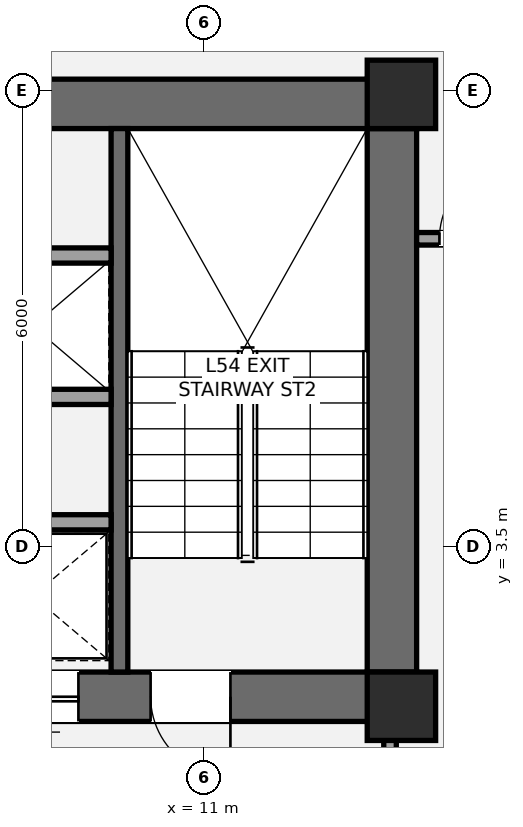
"""IFC4 building model, lengths in metres.
Left out: names, types, materials, properties, quantities, classifications, styles, units other than length and angle.
Written with IfcOpenShell. Run it as: python <this file> out.ifc"""

import sys

from ifc_helpers import new_model, si_unit, direction, frame, frame_2d, origin, origin_2d, place, context, subcontext, project, spatial, rectangle, extrude, element, fill, save


model = new_model("IFC4")
c1 = context("Model", 3, precision=1e-05, world=origin(), true_north=direction((0.0, 1.0)))
c2 = subcontext(c1, "Body", "Model", "MODEL_VIEW")
j1 = project(units=[si_unit("LENGTHUNIT", "METRE"), si_unit("PLANEANGLEUNIT", "RADIAN")], contexts=[c1])
p1 = place(None, origin())
s1 = spatial("IfcSite", under=j1, at=p1, CompositionType="ELEMENT")
p2 = place(p1, origin())
s2 = spatial("IfcBuilding", under=s1, at=p2, CompositionType="ELEMENT")
p3 = place(p2, frame((0.0, 0.0, 195.0)))
s3 = spatial("IfcBuildingStorey", under=s2, at=p3, CompositionType="ELEMENT", Elevation=195.0)
p4 = place(p3, frame((13.475, 1.2, 0.0), z_axis=(0.0, 0.0, 1.0), x_axis=(0.0, 1.0, 0.0)))
e1 = element("IfcWall", 1, at=p4, inside=s3, PredefinedType="SHEAR", context=c2, shape_type="SweptSolid", body=[
    extrude(rectangle(XDim=8.45, YDim=0.65, at=frame_2d((4.225, 0.0))), origin(), (0.0, 0.0, 1.0), 3.2),
])
p5 = place(p3, frame((4.475, 9.325, 0.0), z_axis=(0.0, 0.0, 1.0), x_axis=(1.0, 0.0, 0.0)))
e2 = element("IfcWall", 2, at=p5, inside=s3, PredefinedType="SHEAR", context=c2, shape_type="SweptSolid", body=[
    extrude(rectangle(XDim=9.325, YDim=0.65, at=frame_2d((4.663, 0.0))), origin(), (0.0, 0.0, 1.0), 3.2),
])
p6 = place(p3, frame((13.8, 1.525, 0.0), z_axis=(0.0, 0.0, 1.0), x_axis=(-1.0, 0.0, 0.0)))
e3 = element("IfcWall", 3, at=p6, inside=s3, PredefinedType="SHEAR", context=c2, shape_type="SweptSolid", body=[
    extrude(rectangle(XDim=8.925, YDim=0.65, at=frame_2d((4.462, 0.0))), origin(), (0.0, 0.0, 1.0), 3.2),
])
p7 = place(p6, frame((2.45, 0.0, 0.0)))
e4 = element("IfcOpeningElement", 4, at=p7, cuts=e3, PredefinedType="OPENING", context=c2, shape_type="SweptSolid", body=[
    extrude(rectangle(XDim=1.05, YDim=2.15, at=frame_2d((0.525, 1.075))), frame((0.0, 0.335, 0.0), z_axis=(0.0, -1.0, 0.0), x_axis=(1.0, 0.0, 0.0)), (0.0, 0.0, 1.0), 0.67),
])
p8 = place(p6, frame((4.45, 0.0, 0.0)))
e5 = element("IfcOpeningElement", 5, at=p8, cuts=e3, PredefinedType="OPENING", context=c2, shape_type="SweptSolid", body=[
    extrude(rectangle(XDim=1.1, YDim=2.2, at=frame_2d((0.55, 1.1))), frame((0.0, 0.335, 0.0), z_axis=(0.0, -1.0, 0.0), x_axis=(1.0, 0.0, 0.0)), (0.0, 0.0, 1.0), 0.67),
])
p9 = place(p3, frame((9.89, 1.85, 0.0), z_axis=(0.0, 0.0, 1.0), x_axis=(0.0, 1.0, 0.0)))
e6 = element("IfcWall", 6, at=p9, inside=s3, PredefinedType="SHEAR", context=c2, shape_type="SweptSolid", body=[
    extrude(rectangle(XDim=7.15, YDim=0.22, at=frame_2d((3.575, 0.0))), origin(), (0.0, 0.0, 1.0), 3.2),
])
for number, where, z_axis, x_axis in (
    (7, (13.6, 1.4, 0.0), (0.0, 0.0, 1.0), (1.0, 0.0, 0.0)),
    (8, (13.6, 9.45, 0.0), (0.0, 0.0, 1.0), (1.0, 0.0, 0.0)),
):
    element("IfcColumn", number, at=place(p3, frame(where, z_axis=z_axis, x_axis=x_axis)), inside=s3, PredefinedType="COLUMN", context=c2, shape_type="SweptSolid", body=[
        extrude(rectangle(XDim=0.9, YDim=0.9, at=origin_2d()), origin(), (0.0, 0.0, 1.0), 3.2),
    ])
p10 = place(p3, frame((13.45, -2.15, 0.0), z_axis=(0.0, 0.0, 1.0), x_axis=(0.0, 1.0, 0.0)))
e9 = element("IfcWall", 9, at=p10, inside=s3, PredefinedType="PARTITIONING", context=c2, shape_type="SweptSolid", body=[
    extrude(rectangle(XDim=3.4, YDim=0.165, at=frame_2d((1.7, 0.0))), origin(), (0.0, 0.0, 1.0), 2.473),
])
p11 = place(p10, frame((1.15, 0.0, 0.0)))
e10 = element("IfcOpeningElement", 10, at=p11, cuts=e9, PredefinedType="OPENING", context=c2, shape_type="SweptSolid", body=[
    extrude(rectangle(XDim=1.05, YDim=2.15, at=frame_2d((0.525, 1.075))), frame((0.0, 0.093, 0.0), z_axis=(0.0, -1.0, 0.0), x_axis=(1.0, 0.0, 0.0)), (0.0, 0.0, 1.0), 0.185),
])
p12 = place(p3, frame((5.525, 3.82, 0.0), z_axis=(0.0, 0.0, 1.0), x_axis=(1.0, 0.0, 0.0)))
e11 = element("IfcWall", 11, at=p12, inside=s3, PredefinedType="SOLIDWALL", context=c2, shape_type="SweptSolid", body=[
    extrude(rectangle(XDim=4.255, YDim=0.2, at=frame_2d((2.127, 0.0))), origin(), (0.0, 0.0, 1.0), 3.02),
])
p13 = place(p12, frame((0.65, 0.0, 0.0)))
e12 = element("IfcOpeningElement", 12, at=p13, cuts=e11, PredefinedType="OPENING", context=c2, shape_type="SweptSolid", body=[
    extrude(rectangle(XDim=1.2, YDim=2.2, at=frame_2d((0.6, 1.1))), frame((0.0, 0.11, 0.0), z_axis=(0.0, -1.0, 0.0), x_axis=(1.0, 0.0, 0.0)), (0.0, 0.0, 1.0), 0.22),
])
for number, where, z_axis, x_axis in (
    (13, (5.525, 5.47, 0.0), (0.0, 0.0, 1.0), (1.0, 0.0, 0.0)),
    (14, (5.525, 7.33, 0.0), (0.0, 0.0, 1.0), (1.0, 0.0, 0.0)),
):
    element("IfcWall", number, at=place(p3, frame(where, z_axis=z_axis, x_axis=x_axis)), inside=s3, PredefinedType="SOLIDWALL", context=c2, shape_type="SweptSolid", body=[
        extrude(rectangle(XDim=4.255, YDim=0.2, at=frame_2d((2.127, 0.0))), origin(), (0.0, 0.0, 1.0), 3.02),
    ])
p14 = place(p3, frame((13.8, 7.55, 0.0), z_axis=(0.0, 0.0, 1.0), x_axis=(1.0, 0.0, 0.0)))
e15 = element("IfcWall", 15, at=p14, inside=s3, PredefinedType="PARTITIONING", context=c2, shape_type="SweptSolid", body=[
    extrude(rectangle(XDim=1.75, YDim=0.165, at=frame_2d((0.875, 0.0))), origin(), (0.0, 0.0, 1.0), 3.02),
])
p15 = place(p14, frame((0.3, 0.0, 0.0)))
e16 = element("IfcOpeningElement", 16, at=p15, cuts=e15, PredefinedType="OPENING", context=c2, shape_type="SweptSolid", body=[
    extrude(rectangle(XDim=1.0, YDim=2.15, at=frame_2d((0.5, 1.075))), frame((0.0, 0.093, 0.0), z_axis=(0.0, -1.0, 0.0), x_axis=(1.0, 0.0, 0.0)), (0.0, 0.0, 1.0), 0.185),
])
p16 = place(p7, origin())
e17 = element("IfcDoor", 17, at=p16, inside=s3, OperationType="SINGLE_SWING_LEFT", PredefinedType="DOOR", context=c2, shape_type="SweptSolid", body=[
    extrude(rectangle(XDim=1.05, YDim=2.15, at=frame_2d((0.525, 1.075))), frame((0.0, 0.025, 0.0), z_axis=(0.0, -1.0, 0.0), x_axis=(1.0, 0.0, 0.0)), (0.0, 0.0, 1.0), 0.05),
])
fill(e4, e17)
p17 = place(p8, origin())
e18 = element("IfcDoor", 18, at=p17, inside=s3, OperationType="SLIDING_TO_LEFT", PredefinedType="DOOR", context=c2, shape_type="SweptSolid", body=[
    extrude(rectangle(XDim=1.1, YDim=2.2, at=frame_2d((0.55, 1.1))), frame((0.0, 0.025, 0.0), z_axis=(0.0, -1.0, 0.0), x_axis=(1.0, 0.0, 0.0)), (0.0, 0.0, 1.0), 0.05),
])
fill(e5, e18)
p18 = place(p15, origin())
e19 = element("IfcDoor", 19, at=p18, inside=s3, OperationType="SINGLE_SWING_RIGHT", PredefinedType="DOOR", context=c2, shape_type="SweptSolid", body=[
    extrude(rectangle(XDim=1.0, YDim=2.15, at=frame_2d((0.5, 1.075))), frame((0.0, 0.025, 0.0), z_axis=(0.0, -1.0, 0.0), x_axis=(1.0, 0.0, 0.0)), (0.0, 0.0, 1.0), 0.05),
])
fill(e16, e19)
save(model, sys.argv[1])
